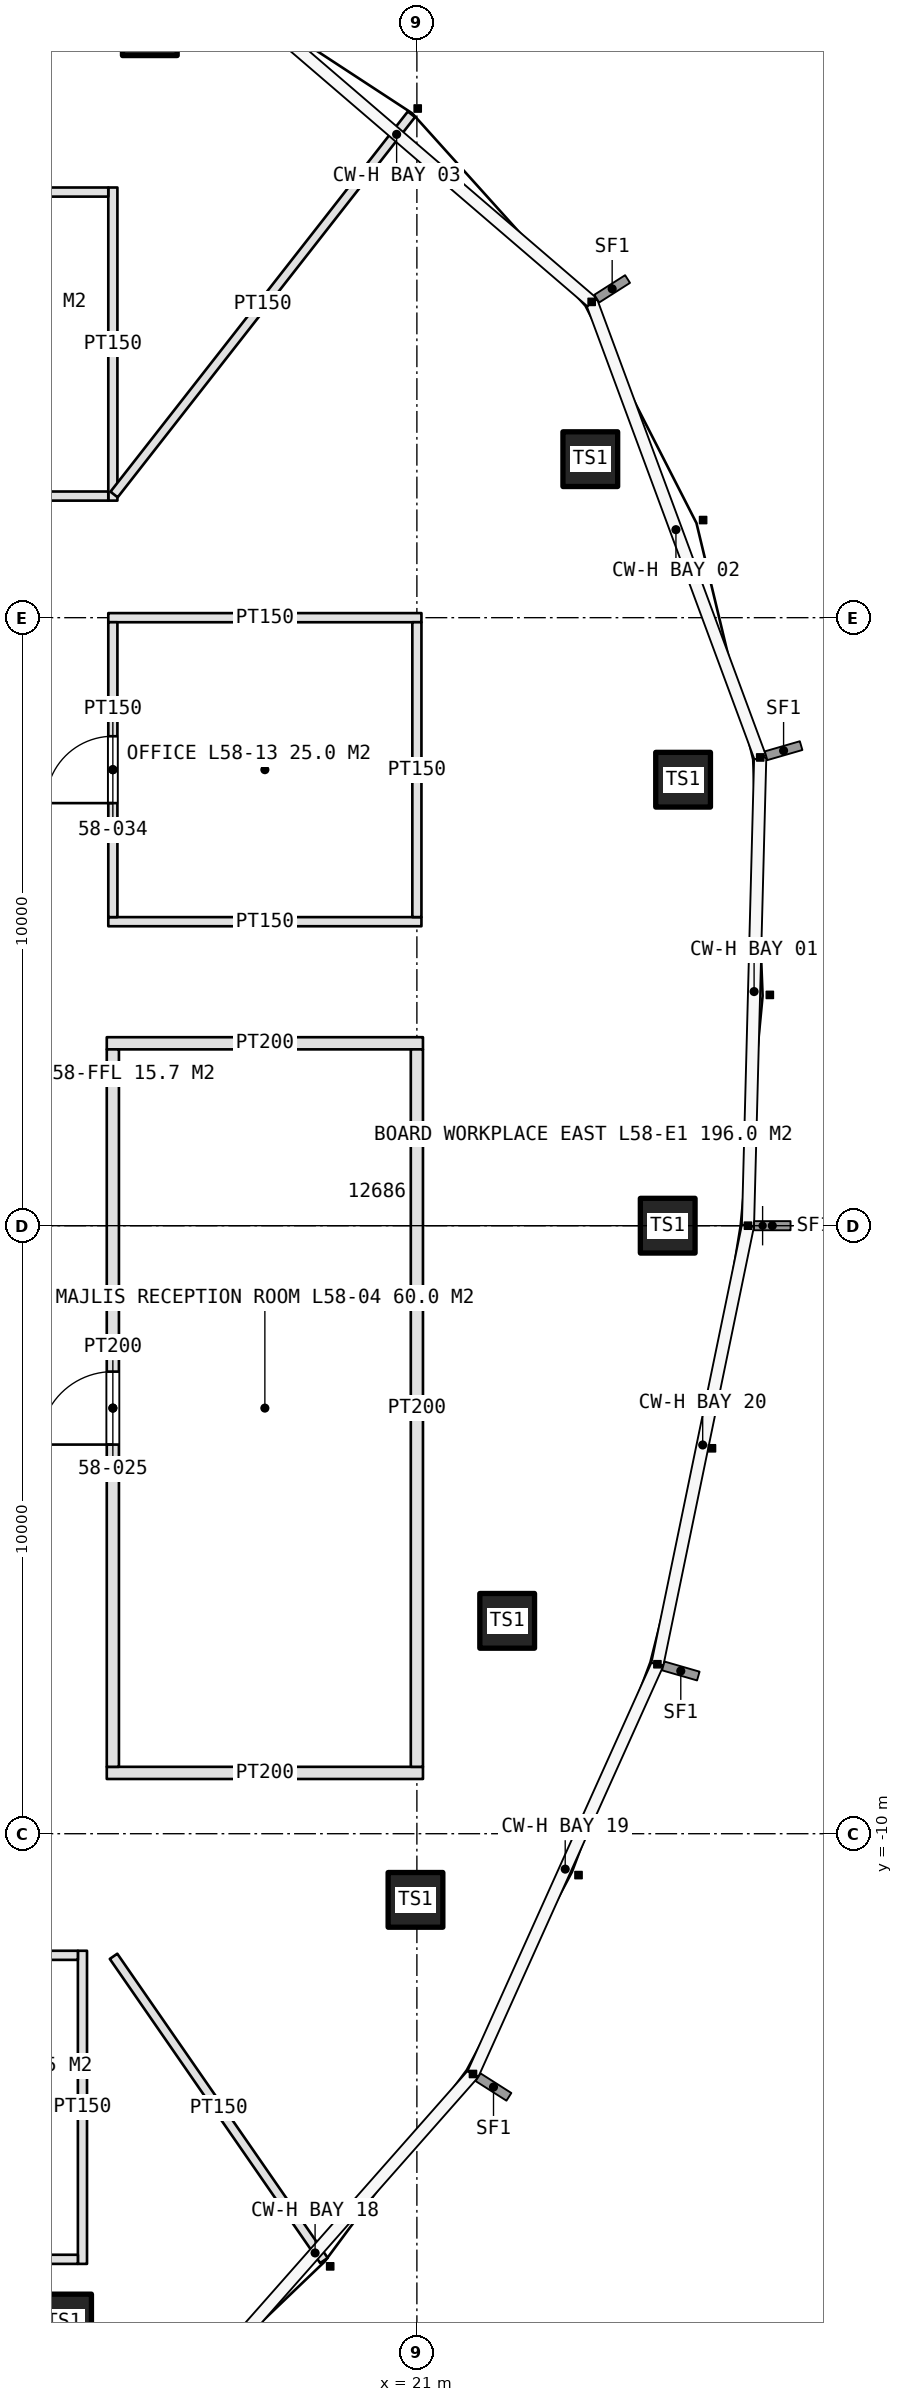
"""IFC4 building model, lengths in metres.
Left out: names, types, materials, properties, quantities, classifications, styles, units other than length and angle.
Written with IfcOpenShell. Run it as: python <this file> out.ifc"""

import sys

from ifc_helpers import new_model, si_unit, direction, frame, frame_2d, origin, origin_2d, place, context, subcontext, project, spatial, rectangle, hollow_rectangle, extrude, element, fill, save


model = new_model("IFC4")
c1 = context("Model", 3, precision=1e-05, world=origin(), true_north=direction((0.0, 1.0)))
c2 = subcontext(c1, "Body", "Model", "MODEL_VIEW")
j1 = project(units=[si_unit("LENGTHUNIT", "METRE"), si_unit("PLANEANGLEUNIT", "RADIAN")], contexts=[c1])
p1 = place(None, origin())
s1 = spatial("IfcSite", under=j1, at=p1, CompositionType="ELEMENT")
p2 = place(p1, origin())
s2 = spatial("IfcBuilding", under=s1, at=p2, CompositionType="ELEMENT")
p3 = place(p2, frame((0.0, 0.0, 262.0)))
s3 = spatial("IfcBuildingStorey", under=s2, at=p3, CompositionType="ELEMENT", Elevation=262.0)
for number, where, z_axis, x_axis in (
    (1, (25.125, 0.0, 0.0), (0.0, 0.0, 1.0), (1.0, 0.0, 0.0)),
    (2, (25.378, 7.335, 0.0), (0.0, 0.0, 1.0), (1.0, 0.0, 0.0)),
    (3, (23.852, 12.607, 0.0), (0.0, 0.0, 1.0), (1.0, 0.0, 0.0)),
    (4, (16.608, 19.695, 0.0), (0.0, 0.0, 1.0), (1.0, 0.0, 0.0)),
):
    element("IfcColumn", number, at=place(p3, frame(where, z_axis=z_axis, x_axis=x_axis)), inside=s3, PredefinedType="COLUMN", context=c2, shape_type="SweptSolid", body=[
        extrude(hollow_rectangle(XDim=0.9, YDim=0.9, WallThickness=0.08, at=origin_2d()), origin(), (0.0, 0.0, 1.0), 3.425),
    ])
for number, where, z_axis, x_axis in (
    (5, (15.198, -18.023, 0.0), (0.0, 0.0, 1.0), (1.0, 0.0, 0.0)),
    (6, (20.977, -11.088, 0.0), (0.0, 0.0, 1.0), (1.0, 0.0, 0.0)),
    (7, (22.485, -6.499, 0.0), (0.0, 0.0, 1.0), (1.0, 0.0, 0.0)),
):
    element("IfcColumn", number, at=place(p3, frame(where, z_axis=z_axis, x_axis=x_axis)), inside=s3, PredefinedType="COLUMN", context=c2, shape_type="SweptSolid", body=[
        extrude(hollow_rectangle(XDim=0.9, YDim=0.9, WallThickness=0.08, at=origin_2d()), origin(), (0.0, 0.0, 1.0), 4.2),
    ])
p4 = place(p3, frame((16.0, 11.925, 0.0), z_axis=(0.0, 0.0, 1.0), x_axis=(0.0, 1.0, 0.0)))
e8 = element("IfcWall", 8, at=p4, inside=s3, PredefinedType="PARTITIONING", context=c2, shape_type="SweptSolid", body=[
    extrude(rectangle(XDim=5.15, YDim=0.15, at=frame_2d((2.575, 0.0))), origin(), (0.0, 0.0, 1.0), 3.0),
])
p5 = place(p3, frame((9.075, 12.0, 0.0), z_axis=(0.0, 0.0, 1.0), x_axis=(1.0, 0.0, 0.0)))
e9 = element("IfcWall", 9, at=p5, inside=s3, PredefinedType="PARTITIONING", context=c2, shape_type="SweptSolid", body=[
    extrude(rectangle(XDim=6.85, YDim=0.15, at=frame_2d((3.425, 0.0))), origin(), (0.0, 0.0, 1.0), 3.0),
])
p6 = place(p5, frame((2.875, 0.0, 0.0)))
e10 = element("IfcOpeningElement", 10, at=p6, cuts=e9, PredefinedType="OPENING", context=c2, shape_type="SweptSolid", body=[
    extrude(rectangle(XDim=1.1, YDim=2.3, at=frame_2d((0.55, 1.15))), frame((0.0, 0.085, 0.0), z_axis=(0.0, -1.0, 0.0), x_axis=(1.0, 0.0, 0.0)), (0.0, 0.0, 1.0), 0.17),
])
p7 = place(p3, frame((9.075, 17.0, 0.0), z_axis=(0.0, 0.0, 1.0), x_axis=(1.0, 0.0, 0.0)))
e11 = element("IfcWall", 11, at=p7, inside=s3, PredefinedType="PARTITIONING", context=c2, shape_type="SweptSolid", body=[
    extrude(rectangle(XDim=6.85, YDim=0.15, at=frame_2d((3.425, 0.0))), origin(), (0.0, 0.0, 1.0), 3.0),
])
for number, where, z_axis, x_axis in (
    (12, (15.9, -9.0, 0.0), (0.0, 0.0, 1.0), (1.0, 0.0, 0.0)),
    (13, (15.9, 3.0, 0.0), (0.0, 0.0, 1.0), (1.0, 0.0, 0.0)),
):
    element("IfcWall", number, at=place(p3, frame(where, z_axis=z_axis, x_axis=x_axis)), inside=s3, PredefinedType="PARTITIONING", context=c2, shape_type="SweptSolid", body=[
        extrude(rectangle(XDim=5.2, YDim=0.2, at=frame_2d((2.6, 0.0))), origin(), (0.0, 0.0, 1.0), 3.0),
    ])
p8 = place(p3, frame((16.0, -8.9, 0.0), z_axis=(0.0, 0.0, 1.0), x_axis=(0.0, 1.0, 0.0)))
e14 = element("IfcWall", 14, at=p8, inside=s3, PredefinedType="PARTITIONING", context=c2, shape_type="SweptSolid", body=[
    extrude(rectangle(XDim=11.8, YDim=0.2, at=frame_2d((5.9, 0.0))), origin(), (0.0, 0.0, 1.0), 3.0),
])
p9 = place(p8, frame((5.3, 0.0, 0.0)))
e15 = element("IfcOpeningElement", 15, at=p9, cuts=e14, PredefinedType="OPENING", context=c2, shape_type="SweptSolid", body=[
    extrude(rectangle(XDim=1.2, YDim=2.4, at=frame_2d((0.6, 1.2))), frame((0.0, 0.11, 0.0), z_axis=(0.0, -1.0, 0.0), x_axis=(1.0, 0.0, 0.0)), (0.0, 0.0, 1.0), 0.22),
])
p10 = place(p3, frame((21.0, -8.9, 0.0), z_axis=(0.0, 0.0, 1.0), x_axis=(0.0, 1.0, 0.0)))
e16 = element("IfcWall", 16, at=p10, inside=s3, PredefinedType="PARTITIONING", context=c2, shape_type="SweptSolid", body=[
    extrude(rectangle(XDim=11.8, YDim=0.2, at=frame_2d((5.9, 0.0))), origin(), (0.0, 0.0, 1.0), 3.0),
])
p11 = place(p3, frame((15.5, -11.925, 0.0), z_axis=(0.0, 0.0, 1.0), x_axis=(0.0, -1.0, 0.0)))
e17 = element("IfcWall", 17, at=p11, inside=s3, PredefinedType="PARTITIONING", context=c2, shape_type="SweptSolid", body=[
    extrude(rectangle(XDim=5.15, YDim=0.15, at=frame_2d((2.575, 0.0))), origin(), (0.0, 0.0, 1.0), 3.0),
])
p12 = place(p3, frame((12.075, -12.0, 0.0), z_axis=(0.0, 0.0, 1.0), x_axis=(1.0, 0.0, 0.0)))
e18 = element("IfcWall", 18, at=p12, inside=s3, PredefinedType="PARTITIONING", context=c2, shape_type="SweptSolid", body=[
    extrude(rectangle(XDim=3.35, YDim=0.15, at=frame_2d((1.675, 0.0))), origin(), (0.0, 0.0, 1.0), 3.0),
])
p13 = place(p12, frame((1.175, 0.0, 0.0)))
e19 = element("IfcOpeningElement", 19, at=p13, cuts=e18, PredefinedType="OPENING", context=c2, shape_type="SweptSolid", body=[
    extrude(rectangle(XDim=1.0, YDim=2.2, at=frame_2d((0.5, 1.1))), frame((0.0, 0.085, 0.0), z_axis=(0.0, -1.0, 0.0), x_axis=(1.0, 0.0, 0.0)), (0.0, 0.0, 1.0), 0.17),
])
p14 = place(p3, frame((12.075, -17.0, 0.0), z_axis=(0.0, 0.0, 1.0), x_axis=(1.0, 0.0, 0.0)))
e20 = element("IfcWall", 20, at=p14, inside=s3, PredefinedType="PARTITIONING", context=c2, shape_type="SweptSolid", body=[
    extrude(rectangle(XDim=3.35, YDim=0.15, at=frame_2d((1.675, 0.0))), origin(), (0.0, 0.0, 1.0), 3.0),
])
for number, where, z_axis, x_axis in (
    (21, (15.925, 5.0, 0.0), (0.0, 0.0, 1.0), (1.0, 0.0, 0.0)),
    (22, (15.925, 10.0, 0.0), (0.0, 0.0, 1.0), (1.0, 0.0, 0.0)),
):
    element("IfcWall", number, at=place(p3, frame(where, z_axis=z_axis, x_axis=x_axis)), inside=s3, PredefinedType="PARTITIONING", context=c2, shape_type="SweptSolid", body=[
        extrude(rectangle(XDim=5.15, YDim=0.15, at=frame_2d((2.575, 0.0))), origin(), (0.0, 0.0, 1.0), 3.0),
    ])
p15 = place(p3, frame((16.0, 5.075, 0.0), z_axis=(0.0, 0.0, 1.0), x_axis=(0.0, 1.0, 0.0)))
e23 = element("IfcWall", 23, at=p15, inside=s3, PredefinedType="PARTITIONING", context=c2, shape_type="SweptSolid", body=[
    extrude(rectangle(XDim=4.85, YDim=0.15, at=frame_2d((2.425, 0.0))), origin(), (0.0, 0.0, 1.0), 3.0),
])
p16 = place(p15, frame((1.875, 0.0, 0.0)))
e24 = element("IfcOpeningElement", 24, at=p16, cuts=e23, PredefinedType="OPENING", context=c2, shape_type="SweptSolid", body=[
    extrude(rectangle(XDim=1.1, YDim=2.3, at=frame_2d((0.55, 1.15))), frame((0.0, 0.085, 0.0), z_axis=(0.0, -1.0, 0.0), x_axis=(1.0, 0.0, 0.0)), (0.0, 0.0, 1.0), 0.17),
])
p17 = place(p3, frame((21.0, 5.075, 0.0), z_axis=(0.0, 0.0, 1.0), x_axis=(0.0, 1.0, 0.0)))
e25 = element("IfcWall", 25, at=p17, inside=s3, PredefinedType="PARTITIONING", context=c2, shape_type="SweptSolid", body=[
    extrude(rectangle(XDim=4.85, YDim=0.15, at=frame_2d((2.425, 0.0))), origin(), (0.0, 0.0, 1.0), 3.0),
])
p18 = place(p3, frame((16.011, -12.016, 0.0), z_axis=(0.0, 0.0, 1.0), x_axis=(0.568863489071, -0.822431961199, 0.0)))
e26 = element("IfcWall", 26, at=p18, inside=s3, PredefinedType="PARTITIONING", context=c2, shape_type="SweptSolid", body=[
    extrude(rectangle(XDim=6.083, YDim=0.15, at=frame_2d((3.042, 0.0))), origin(), (0.0, 0.0, 1.0), 3.0),
])
p19 = place(p3, frame((16.02, 12.026, 0.0), z_axis=(0.0, 0.0, 1.0), x_axis=(0.616031272047, 0.787721696959, 0.0)))
e27 = element("IfcWall", 27, at=p19, inside=s3, PredefinedType="PARTITIONING", context=c2, shape_type="SweptSolid", body=[
    extrude(rectangle(XDim=7.939, YDim=0.15, at=frame_2d((3.969, 0.0))), origin(), (0.0, 0.0, 1.0), 3.0),
])
p20 = place(p9, origin())
e28 = element("IfcDoor", 28, at=p20, inside=s3, OperationType="SINGLE_SWING_LEFT", PredefinedType="DOOR", context=c2, shape_type="SweptSolid", body=[
    extrude(rectangle(XDim=1.2, YDim=2.4, at=frame_2d((0.6, 1.2))), frame((0.0, 0.025, 0.0), z_axis=(0.0, -1.0, 0.0), x_axis=(1.0, 0.0, 0.0)), (0.0, 0.0, 1.0), 0.05),
])
fill(e15, e28)
p21 = place(p16, origin())
e29 = element("IfcDoor", 29, at=p21, inside=s3, OperationType="SINGLE_SWING_LEFT", PredefinedType="DOOR", context=c2, shape_type="SweptSolid", body=[
    extrude(rectangle(XDim=1.1, YDim=2.3, at=frame_2d((0.55, 1.15))), frame((0.0, 0.025, 0.0), z_axis=(0.0, -1.0, 0.0), x_axis=(1.0, 0.0, 0.0)), (0.0, 0.0, 1.0), 0.05),
])
fill(e24, e29)
save(model, sys.argv[1])
